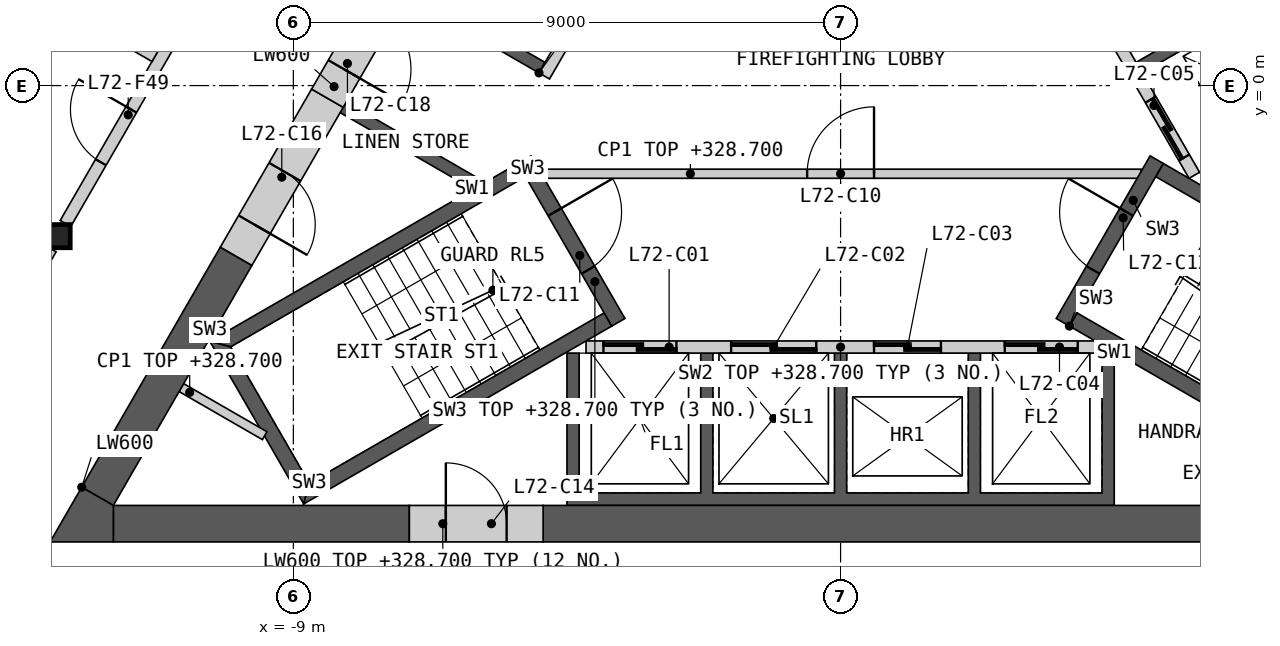
"""IFC4 building model, lengths in metres.
Left out: names, types, materials, properties, quantities, classifications, styles, units other than length and angle.
Written with IfcOpenShell. Run it as: python <this file> out.ifc"""

import sys

from ifc_helpers import new_model, si_unit, direction, frame, frame_2d, origin, origin_2d, place, context, subcontext, project, spatial, polyline, rectangle, i_section, outline, extrude, element, fill, save


model = new_model("IFC4")
c1 = context("Model", 3, precision=1e-05, world=origin(), true_north=direction((0.0, 1.0)))
c2 = subcontext(c1, "Body", "Model", "MODEL_VIEW")
j1 = project(units=[si_unit("LENGTHUNIT", "METRE"), si_unit("PLANEANGLEUNIT", "RADIAN")], contexts=[c1])
p1 = place(None, origin())
s1 = spatial("IfcSite", under=j1, at=p1, CompositionType="ELEMENT")
p2 = place(p1, origin())
s2 = spatial("IfcBuilding", under=s1, at=p2, CompositionType="ELEMENT")
p3 = place(p2, frame((0.0, 0.0, 325.6)))
s3 = spatial("IfcBuildingStorey", under=s2, at=p3, CompositionType="ELEMENT", Elevation=325.6)
p4 = place(p3, frame((-12.868, -2.476, 0.0), z_axis=(0.0, 0.0, 1.0), x_axis=(1.0, 0.0, 0.0)))
e1 = element("IfcColumn", 1, at=p4, inside=s3, PredefinedType="COLUMN", context=c2, shape_type="SweptSolid", body=[
    extrude(i_section(OverallWidth=0.396, OverallDepth=0.381, WebThickness=0.019, FlangeThickness=0.03, at=origin_2d()), origin(), (0.0, 0.0, 1.0), 3.4),
])
p5 = place(p3, origin())
e2 = element("IfcWall", 2, at=p5, inside=s3, PredefinedType="SHEAR", context=c2, shape_type="SweptSolid", body=[
    extrude(outline(polyline([(4.5, -4.4), (4.5, -6.906), (-4.5, -6.906), (-4.5, -4.4), (-4.3, -4.4), (-4.3, -6.7), (-2.3, -6.7), (-2.3, -4.4), (-2.1, -4.4), (-2.1, -6.7), (-0.1, -6.7), (-0.1, -4.4), (0.1, -4.4), (0.1, -6.7), (2.1, -6.7), (2.1, -4.4), (2.3, -4.4), (2.3, -6.7), (4.3, -6.7), (4.3, -4.4), (4.5, -4.4)])), origin(), (0.0, 0.0, 1.0), 3.1),
])
p6 = place(p3, frame((-4.187, -4.3, 0.0), z_axis=(0.0, 0.0, 1.0), x_axis=(1.0, 0.0, 0.0)))
e3 = element("IfcWall", 3, at=p6, inside=s3, PredefinedType="SOLIDWALL", context=c2, shape_type="SweptSolid", body=[
    extrude(rectangle(XDim=8.373, YDim=0.2, at=frame_2d((4.187, 0.0))), origin(), (0.0, 0.0, 1.0), 3.1),
])
p7 = place(p6, frame((0.287, 0.0, 0.0)))
e4 = element("IfcOpeningElement", 4, at=p7, cuts=e3, PredefinedType="OPENING", context=c2, shape_type="SweptSolid", body=[
    extrude(rectangle(XDim=1.2, YDim=2.1, at=frame_2d((0.6, 1.05))), frame((0.0, 0.11, 0.0), z_axis=(0.0, -1.0, 0.0), x_axis=(1.0, 0.0, 0.0)), (0.0, 0.0, 1.0), 0.22),
])
p8 = place(p6, frame((2.387, 0.0, 0.0)))
e5 = element("IfcOpeningElement", 5, at=p8, cuts=e3, PredefinedType="OPENING", context=c2, shape_type="SweptSolid", body=[
    extrude(rectangle(XDim=1.4, YDim=2.1, at=frame_2d((0.7, 1.05))), frame((0.0, 0.11, 0.0), z_axis=(0.0, -1.0, 0.0), x_axis=(1.0, 0.0, 0.0)), (0.0, 0.0, 1.0), 0.22),
])
p9 = place(p6, frame((4.737, 0.0, 0.0)))
e6 = element("IfcOpeningElement", 6, at=p9, cuts=e3, PredefinedType="OPENING", context=c2, shape_type="SweptSolid", body=[
    extrude(rectangle(XDim=1.1, YDim=2.1, at=frame_2d((0.55, 1.05))), frame((0.0, 0.11, 0.0), z_axis=(0.0, -1.0, 0.0), x_axis=(1.0, 0.0, 0.0)), (0.0, 0.0, 1.0), 0.22),
])
p10 = place(p6, frame((6.887, 0.0, 0.0)))
e7 = element("IfcOpeningElement", 7, at=p10, cuts=e3, PredefinedType="OPENING", context=c2, shape_type="SweptSolid", body=[
    extrude(rectangle(XDim=1.2, YDim=2.1, at=frame_2d((0.6, 1.05))), frame((0.0, 0.11, 0.0), z_axis=(0.0, -1.0, 0.0), x_axis=(1.0, 0.0, 0.0)), (0.0, 0.0, 1.0), 0.22),
])
p11 = place(p3, origin())
e8 = element("IfcWall", 8, at=p11, inside=s3, PredefinedType="SHEAR", context=c2, shape_type="SweptSolid", body=[
    extrude(outline(polyline([(1.561, 6.097), (3.731, 7.35), (8.231, -0.444), (6.061, -1.697), (5.96, -1.524), (7.952, -0.374), (6.952, 1.358), (4.96, 0.208), (4.861, 0.381), (6.852, 1.531), (5.852, 3.263), (3.861, 2.113), (3.76, 2.287), (5.752, 3.437), (4.752, 5.169), (2.76, 4.019), (2.66, 4.192), (4.652, 5.342), (3.652, 7.074), (1.66, 5.924), (1.561, 6.097)])), origin(), (0.0, 0.0, 1.0), 3.1),
])
p12 = place(p3, frame((5.817, -1.476, 0.0), z_axis=(0.0, 0.0, 1.0), x_axis=(-0.500002616675, 0.866023893041, 0.0)))
e9 = element("IfcWall", 9, at=p12, inside=s3, PredefinedType="SOLIDWALL", context=c2, shape_type="SweptSolid", body=[
    extrude(rectangle(XDim=8.373, YDim=0.2, at=frame_2d((4.187, 0.0))), origin(), (0.0, 0.0, 1.0), 3.1),
])
p13 = place(p12, frame((0.337, 0.0, 0.0)))
e10 = element("IfcOpeningElement", 10, at=p13, cuts=e9, PredefinedType="OPENING", context=c2, shape_type="SweptSolid", body=[
    extrude(rectangle(XDim=1.1, YDim=2.1, at=frame_2d((0.55, 1.05))), frame((0.0, 0.11, 0.0), z_axis=(0.0, -1.0, 0.0), x_axis=(1.0, 0.0, 0.0)), (0.0, 0.0, 1.0), 0.22),
])
p14 = place(p12, frame((2.537, 0.0, 0.0)))
e11 = element("IfcOpeningElement", 11, at=p14, cuts=e9, PredefinedType="OPENING", context=c2, shape_type="SweptSolid", body=[
    extrude(rectangle(XDim=1.1, YDim=2.1, at=frame_2d((0.55, 1.05))), frame((0.0, 0.11, 0.0), z_axis=(0.0, -1.0, 0.0), x_axis=(1.0, 0.0, 0.0)), (0.0, 0.0, 1.0), 0.22),
])
p15 = place(p12, frame((4.737, 0.0, 0.0)))
e12 = element("IfcOpeningElement", 12, at=p15, cuts=e9, PredefinedType="OPENING", context=c2, shape_type="SweptSolid", body=[
    extrude(rectangle(XDim=1.1, YDim=2.1, at=frame_2d((0.55, 1.05))), frame((0.0, 0.11, 0.0), z_axis=(0.0, -1.0, 0.0), x_axis=(1.0, 0.0, 0.0)), (0.0, 0.0, 1.0), 0.22),
])
p16 = place(p12, frame((7.037, 0.0, 0.0)))
e13 = element("IfcOpeningElement", 13, at=p16, cuts=e9, PredefinedType="OPENING", context=c2, shape_type="SweptSolid", body=[
    extrude(rectangle(XDim=0.9, YDim=2.1, at=frame_2d((0.45, 1.05))), frame((0.0, 0.11, 0.0), z_axis=(0.0, -1.0, 0.0), x_axis=(1.0, 0.0, 0.0)), (0.0, 0.0, 1.0), 0.22),
])
p17 = place(p3, origin())
e14 = element("IfcWall", 14, at=p17, inside=s3, PredefinedType="SHEAR", context=c2, shape_type="SweptSolid", body=[
    extrude(outline(polyline([(-6.061, -1.697), (-8.231, -0.444), (-8.131, -0.271), (-5.96, -1.524), (-6.061, -1.697)])), origin(), (0.0, 0.0, 1.0), 3.1),
])
p18 = place(p3, origin())
e15 = element("IfcWall", 15, at=p18, inside=s3, PredefinedType="SHEAR", context=c2, shape_type="SweptSolid", body=[
    extrude(outline(polyline([(-4.96, 0.208), (-7.131, 1.461), (-3.731, 7.35), (-1.561, 6.097), (-1.66, 5.924), (-3.652, 7.074), (-6.852, 1.531), (-4.861, 0.381), (-4.96, 0.208)])), origin(), (0.0, 0.0, 1.0), 3.1),
])
p19 = place(p3, frame((-1.631, 5.776, 0.0), z_axis=(0.0, 0.0, 1.0), x_axis=(-0.499992876559, -0.866029516466, 0.0)))
e16 = element("IfcWall", 16, at=p19, inside=s3, PredefinedType="SOLIDWALL", context=c2, shape_type="SweptSolid", body=[
    extrude(rectangle(XDim=6.486, YDim=0.2, at=frame_2d((3.243, 0.0))), origin(), (0.0, 0.0, 1.0), 3.1),
])
p20 = place(p19, frame((2.637, 0.0, 0.0)))
e17 = element("IfcOpeningElement", 17, at=p20, cuts=e16, PredefinedType="OPENING", context=c2, shape_type="SweptSolid", body=[
    extrude(rectangle(XDim=0.9, YDim=2.1, at=frame_2d((0.45, 1.05))), frame((0.0, 0.11, 0.0), z_axis=(0.0, -1.0, 0.0), x_axis=(1.0, 0.0, 0.0)), (0.0, 0.0, 1.0), 0.22),
])
p21 = place(p3, frame((-4.941, -1.45, 0.0), z_axis=(0.0, 0.0, 1.0), x_axis=(1.0, 0.0, 0.0)))
e18 = element("IfcWall", 18, at=p21, inside=s3, PredefinedType="PARTITIONING", context=c2, shape_type="SweptSolid", body=[
    extrude(rectangle(XDim=9.882, YDim=0.15, at=frame_2d((4.941, 0.0))), origin(), (0.0, 0.0, 1.0), 3.1),
])
p22 = place(p21, frame((4.391, 0.0, 0.0)))
e19 = element("IfcOpeningElement", 19, at=p22, cuts=e18, PredefinedType="OPENING", context=c2, shape_type="SweptSolid", body=[
    extrude(rectangle(XDim=1.1, YDim=2.1, at=frame_2d((0.55, 1.05))), frame((0.0, 0.085, 0.0), z_axis=(0.0, -1.0, 0.0), x_axis=(1.0, 0.0, 0.0)), (0.0, 0.0, 1.0), 0.17),
])
p23 = place(p3, origin())
e20 = element("IfcWall", 20, at=p23, inside=s3, PredefinedType="SHEAR", context=c2, shape_type="SweptSolid", body=[
    extrude(outline(polyline([(-5.307, -1.281), (-10.374, -4.206), (-10.032, -4.298), (-5.182, -1.498), (-5.307, -1.281)])), origin(), (0.0, 0.0, 1.0), 3.1),
])
p24 = place(p3, origin())
e21 = element("IfcWall", 21, at=p24, inside=s3, PredefinedType="SHEAR", context=c2, shape_type="SweptSolid", body=[
    extrude(outline(polyline([(-10.374, -4.206), (-8.83, -6.881), (-8.738, -6.539), (-10.032, -4.298), (-10.374, -4.206)])), origin(), (0.0, 0.0, 1.0), 3.1),
])
p25 = place(p3, origin())
e22 = element("IfcWall", 22, at=p25, inside=s3, PredefinedType="SHEAR", context=c2, shape_type="SweptSolid", body=[
    extrude(outline(polyline([(-8.738, -6.539), (-8.83, -6.881), (-3.763, -3.956), (-3.888, -3.739), (-8.738, -6.539)])), origin(), (0.0, 0.0, 1.0), 3.1),
])
p26 = place(p3, frame((-5.199, -1.219, 0.0), z_axis=(0.0, 0.0, 1.0), x_axis=(0.499982516597, -0.866035497597, 0.0)))
e23 = element("IfcWall", 23, at=p26, inside=s3, PredefinedType="SHEAR", context=c2, shape_type="SweptSolid", body=[
    extrude(rectangle(XDim=3.088, YDim=0.25, at=frame_2d((1.544, 0.0))), origin(), (0.0, 0.0, 1.0), 3.1),
])
p27 = place(p26, frame((0.994, 0.0, 0.0)))
e24 = element("IfcOpeningElement", 24, at=p27, cuts=e23, PredefinedType="OPENING", context=c2, shape_type="SweptSolid", body=[
    extrude(rectangle(XDim=1.1, YDim=2.1, at=frame_2d((0.55, 1.05))), frame((0.0, 0.135, 0.0), z_axis=(0.0, -1.0, 0.0), x_axis=(1.0, 0.0, 0.0)), (0.0, 0.0, 1.0), 0.27),
])
p28 = place(p3, origin())
e25 = element("IfcWall", 25, at=p28, inside=s3, PredefinedType="SHEAR", context=c2, shape_type="SweptSolid", body=[
    extrude(outline(polyline([(3.763, -3.956), (8.83, -6.881), (8.738, -6.539), (3.888, -3.739), (3.763, -3.956)])), origin(), (0.0, 0.0, 1.0), 3.1),
])
p29 = place(p3, origin())
e26 = element("IfcWall", 26, at=p29, inside=s3, PredefinedType="SHEAR", context=c2, shape_type="SweptSolid", body=[
    extrude(outline(polyline([(10.032, -4.298), (10.374, -4.206), (5.307, -1.281), (5.182, -1.498), (10.032, -4.298)])), origin(), (0.0, 0.0, 1.0), 3.1),
])
p30 = place(p3, frame((3.655, -3.893, 0.0), z_axis=(0.0, 0.0, 1.0), x_axis=(0.499982516597, 0.866035497597, 0.0)))
e27 = element("IfcWall", 27, at=p30, inside=s3, PredefinedType="SHEAR", context=c2, shape_type="SweptSolid", body=[
    extrude(rectangle(XDim=3.088, YDim=0.25, at=frame_2d((1.544, 0.0))), origin(), (0.0, 0.0, 1.0), 3.1),
])
p31 = place(p30, frame((0.994, 0.0, 0.0)))
e28 = element("IfcOpeningElement", 28, at=p31, cuts=e27, PredefinedType="OPENING", context=c2, shape_type="SweptSolid", body=[
    extrude(rectangle(XDim=1.1, YDim=2.1, at=frame_2d((0.55, 1.05))), frame((0.0, 0.135, 0.0), z_axis=(0.0, -1.0, 0.0), x_axis=(1.0, 0.0, 0.0)), (0.0, 0.0, 1.0), 0.27),
])
p32 = place(p3, frame((-10.842, -4.967, 0.0), z_axis=(0.0, 0.0, 1.0), x_axis=(0.866098216386, -0.499873863663, 0.0)))
e29 = element("IfcWall", 29, at=p32, inside=s3, PredefinedType="PARTITIONING", context=c2, shape_type="SweptSolid", body=[
    extrude(rectangle(XDim=1.582, YDim=0.15, at=frame_2d((0.791, 0.0))), origin(), (0.0, 0.0, 1.0), 3.1),
])
p33 = place(p3, frame((-4.892, -7.206, 0.0), z_axis=(0.0, 0.0, 1.0), x_axis=(1.0, 0.0, 0.0)))
e30 = element("IfcWall", 30, at=p33, inside=s3, PredefinedType="SHEAR", context=c2, shape_type="SweptSolid", body=[
    extrude(rectangle(XDim=16.853, YDim=0.6, at=frame_2d((8.426, 0.0))), origin(), (0.0, 0.0, 1.0), 3.1),
])
p34 = place(p3, frame((-11.961, -7.206, 0.0), z_axis=(0.0, 0.0, 1.0), x_axis=(1.0, 0.0, 0.0)))
e31 = element("IfcWall", 31, at=p34, inside=s3, PredefinedType="SHEAR", context=c2, shape_type="SweptSolid", body=[
    extrude(rectangle(XDim=4.868, YDim=0.6, at=frame_2d((2.434, 0.0))), origin(), (0.0, 0.0, 1.0), 3.1),
])
p35 = place(p3, frame((8.686, -0.634, 0.0), z_axis=(0.0, 0.0, 1.0), x_axis=(-0.500004601921, 0.866022746848, 0.0)))
e32 = element("IfcWall", 32, at=p35, inside=s3, PredefinedType="SHEAR", context=c2, shape_type="SweptSolid", body=[
    extrude(rectangle(XDim=16.853, YDim=0.6, at=frame_2d((8.426, 0.0))), origin(), (0.0, 0.0, 1.0), 3.1),
])
p36 = place(p3, frame((-9.941, -2.807, 0.0), z_axis=(0.0, 0.0, 1.0), x_axis=(-0.500020646047, -0.866013483456, 0.0)))
e33 = element("IfcWall", 33, at=p36, inside=s3, PredefinedType="SHEAR", context=c2, shape_type="SweptSolid", body=[
    extrude(rectangle(XDim=4.559, YDim=0.6, at=frame_2d((2.28, 0.0))), origin(), (0.0, 0.0, 1.0), 3.1),
])
p37 = place(p3, origin())
e34 = element("IfcWall", 34, at=p37, inside=s3, PredefinedType="SHEAR", context=c2, shape_type="SweptSolid", body=[
    extrude(outline(polyline([(-12.48, -6.606), (-11.961, -6.906), (-11.961, -7.506), (-13.0, -7.506), (-12.48, -6.606)])), origin(), (0.0, 0.0, 1.0), 3.1),
])
p38 = place(p3, frame((-7.092, -7.206, 0.0), z_axis=(0.0, 0.0, 1.0), x_axis=(1.0, 0.0, 0.0)))
e35 = element("IfcWall", 35, at=p38, inside=s3, PredefinedType="SHEAR", context=c2, shape_type="SweptSolid", body=[
    extrude(rectangle(XDim=2.2, YDim=0.6, at=frame_2d((1.1, 0.0))), origin(), (0.0, 0.0, 1.0), 3.1),
])
p39 = place(p38, frame((0.6, 0.0, 0.0)))
e36 = element("IfcOpeningElement", 36, at=p39, cuts=e35, PredefinedType="OPENING", context=c2, shape_type="SweptSolid", body=[
    extrude(rectangle(XDim=1.0, YDim=2.1, at=frame_2d((0.5, 1.05))), frame((0.0, 0.31, 0.0), z_axis=(0.0, -1.0, 0.0), x_axis=(1.0, 0.0, 0.0)), (0.0, 0.0, 1.0), 0.62),
])
p40 = place(p3, frame((-8.44, -0.208, 0.0), z_axis=(0.0, 0.0, 1.0), x_axis=(-0.499997052475, -0.866027105532, 0.0)))
e37 = element("IfcWall", 37, at=p40, inside=s3, PredefinedType="SHEAR", context=c2, shape_type="SweptSolid", body=[
    extrude(rectangle(XDim=3.001, YDim=0.6, at=frame_2d((1.501, 0.0))), origin(), (0.0, 0.0, 1.0), 3.1),
])
p41 = place(p40, frame((1.4, 0.0, 0.0)))
e38 = element("IfcOpeningElement", 38, at=p41, cuts=e37, PredefinedType="OPENING", context=c2, shape_type="SweptSolid", body=[
    extrude(rectangle(XDim=1.0, YDim=2.1, at=frame_2d((0.5, 1.05))), frame((0.0, 0.31, 0.0), z_axis=(0.0, -1.0, 0.0), x_axis=(1.0, 0.0, 0.0)), (0.0, 0.0, 1.0), 0.62),
])
p42 = place(p3, frame((-7.34, 1.698, 0.0), z_axis=(0.0, 0.0, 1.0), x_axis=(-0.50002983664, -0.866008176907, 0.0)))
e39 = element("IfcWall", 39, at=p42, inside=s3, PredefinedType="SHEAR", context=c2, shape_type="SweptSolid", body=[
    extrude(rectangle(XDim=2.2, YDim=0.6, at=frame_2d((1.1, 0.0))), origin(), (0.0, 0.0, 1.0), 3.1),
])
p43 = place(p42, frame((0.55, 0.0, 0.0)))
e40 = element("IfcOpeningElement", 40, at=p43, cuts=e39, PredefinedType="OPENING", context=c2, shape_type="SweptSolid", body=[
    extrude(rectangle(XDim=1.1, YDim=2.1, at=frame_2d((0.55, 1.05))), frame((0.0, 0.31, 0.0), z_axis=(0.0, -1.0, 0.0), x_axis=(1.0, 0.0, 0.0)), (0.0, 0.0, 1.0), 0.62),
])
p44 = place(p3, frame((-12.748, -2.269, 0.0), z_axis=(0.0, 0.0, 1.0), x_axis=(0.499984266882, 0.866034487114, 0.0)))
e41 = element("IfcWall", 41, at=p44, inside=s3, PredefinedType="PARTITIONING", context=c2, shape_type="SweptSolid", body=[
    extrude(rectangle(XDim=8.099, YDim=0.2, at=frame_2d((4.049, 0.0))), origin(), (0.0, 0.0, 1.0), 3.1),
])
p45 = place(p44, frame((1.164, 0.0, 0.0)))
e42 = element("IfcOpeningElement", 42, at=p45, cuts=e41, PredefinedType="OPENING", context=c2, shape_type="SweptSolid", body=[
    extrude(rectangle(XDim=1.0, YDim=2.1, at=frame_2d((0.5, 1.05))), frame((0.0, 0.11, 0.0), z_axis=(0.0, -1.0, 0.0), x_axis=(1.0, 0.0, 0.0)), (0.0, 0.0, 1.0), 0.22),
])
p46 = place(p3, frame((-15.244, -6.592, 0.0), z_axis=(0.0, 0.0, 1.0), x_axis=(0.49999094734, 0.866030630277, 0.0)))
e43 = element("IfcWall", 43, at=p46, inside=s3, PredefinedType="PARTITIONING", context=c2, shape_type="SweptSolid", body=[
    extrude(rectangle(XDim=4.513, YDim=0.2, at=frame_2d((2.256, 0.0))), origin(), (0.0, 0.0, 1.0), 3.1),
])
p47 = place(p3, frame((-13.471, 1.779, 0.0), z_axis=(0.0, 0.0, 1.0), x_axis=(0.865989465428, -0.500062241894, 0.0)))
e44 = element("IfcWall", 44, at=p47, inside=s3, PredefinedType="PARTITIONING", context=c2, shape_type="SweptSolid", body=[
    extrude(rectangle(XDim=2.55, YDim=0.25, at=frame_2d((1.275, 0.0))), origin(), (0.0, 0.0, 1.0), 2.33),
])
p48 = place(p3, frame((-14.889, -0.577, 0.0), z_axis=(0.0, 0.0, 1.0), x_axis=(0.500015767406, 0.866016300277, 0.0)))
e45 = element("IfcWall", 45, at=p48, inside=s3, PredefinedType="PARTITIONING", context=c2, shape_type="SweptSolid", body=[
    extrude(rectangle(XDim=5.5, YDim=0.1, at=frame_2d((2.75, 0.0))), origin(), (0.0, 0.0, 1.0), 2.33),
])
p49 = place(p7, origin())
e46 = element("IfcDoor", 46, at=p49, inside=s3, OperationType="SLIDING_TO_LEFT", PredefinedType="DOOR", context=c2, shape_type="SweptSolid", body=[
    extrude(rectangle(XDim=1.2, YDim=2.1, at=frame_2d((0.6, 1.05))), frame((0.0, 0.025, 0.0), z_axis=(0.0, -1.0, 0.0), x_axis=(1.0, 0.0, 0.0)), (0.0, 0.0, 1.0), 0.05),
])
fill(e4, e46)
p50 = place(p8, origin())
e47 = element("IfcDoor", 47, at=p50, inside=s3, OperationType="SLIDING_TO_LEFT", PredefinedType="DOOR", context=c2, shape_type="SweptSolid", body=[
    extrude(rectangle(XDim=1.4, YDim=2.1, at=frame_2d((0.7, 1.05))), frame((0.0, 0.025, 0.0), z_axis=(0.0, -1.0, 0.0), x_axis=(1.0, 0.0, 0.0)), (0.0, 0.0, 1.0), 0.05),
])
fill(e5, e47)
p51 = place(p9, origin())
e48 = element("IfcDoor", 48, at=p51, inside=s3, OperationType="SLIDING_TO_LEFT", PredefinedType="DOOR", context=c2, shape_type="SweptSolid", body=[
    extrude(rectangle(XDim=1.1, YDim=2.1, at=frame_2d((0.55, 1.05))), frame((0.0, 0.025, 0.0), z_axis=(0.0, -1.0, 0.0), x_axis=(1.0, 0.0, 0.0)), (0.0, 0.0, 1.0), 0.05),
])
fill(e6, e48)
p52 = place(p10, origin())
e49 = element("IfcDoor", 49, at=p52, inside=s3, OperationType="SLIDING_TO_LEFT", PredefinedType="DOOR", context=c2, shape_type="SweptSolid", body=[
    extrude(rectangle(XDim=1.2, YDim=2.1, at=frame_2d((0.6, 1.05))), frame((0.0, 0.025, 0.0), z_axis=(0.0, -1.0, 0.0), x_axis=(1.0, 0.0, 0.0)), (0.0, 0.0, 1.0), 0.05),
])
fill(e7, e49)
p53 = place(p13, origin())
e50 = element("IfcDoor", 50, at=p53, inside=s3, OperationType="SLIDING_TO_LEFT", PredefinedType="DOOR", context=c2, shape_type="SweptSolid", body=[
    extrude(rectangle(XDim=1.1, YDim=2.1, at=frame_2d((0.55, 1.05))), frame((0.0, 0.025, 0.0), z_axis=(0.0, -1.0, 0.0), x_axis=(1.0, 0.0, 0.0)), (0.0, 0.0, 1.0), 0.05),
])
fill(e10, e50)
p54 = place(p22, origin())
e51 = element("IfcDoor", 51, at=p54, inside=s3, OperationType="SINGLE_SWING_RIGHT", PredefinedType="DOOR", context=c2, shape_type="SweptSolid", body=[
    extrude(rectangle(XDim=1.1, YDim=2.1, at=frame_2d((0.55, 1.05))), frame((0.0, 0.025, 0.0), z_axis=(0.0, -1.0, 0.0), x_axis=(1.0, 0.0, 0.0)), (0.0, 0.0, 1.0), 0.05),
])
fill(e19, e51)
p55 = place(p27, origin())
e52 = element("IfcDoor", 52, at=p55, inside=s3, OperationType="SINGLE_SWING_LEFT", PredefinedType="DOOR", context=c2, shape_type="SweptSolid", body=[
    extrude(rectangle(XDim=1.1, YDim=2.1, at=frame_2d((0.55, 1.05))), frame((0.0, 0.025, 0.0), z_axis=(0.0, -1.0, 0.0), x_axis=(1.0, 0.0, 0.0)), (0.0, 0.0, 1.0), 0.05),
])
fill(e24, e52)
p56 = place(p31, origin())
e53 = element("IfcDoor", 53, at=p56, inside=s3, OperationType="SINGLE_SWING_RIGHT", PredefinedType="DOOR", context=c2, shape_type="SweptSolid", body=[
    extrude(rectangle(XDim=1.1, YDim=2.1, at=frame_2d((0.55, 1.05))), frame((0.0, 0.025, 0.0), z_axis=(0.0, -1.0, 0.0), x_axis=(1.0, 0.0, 0.0)), (0.0, 0.0, 1.0), 0.05),
])
fill(e28, e53)
p57 = place(p39, origin())
e54 = element("IfcDoor", 54, at=p57, inside=s3, OperationType="SINGLE_SWING_LEFT", PredefinedType="DOOR", context=c2, shape_type="SweptSolid", body=[
    extrude(rectangle(XDim=1.0, YDim=2.1, at=frame_2d((0.5, 1.05))), frame((0.0, 0.055, 0.0), z_axis=(0.0, -1.0, 0.0), x_axis=(1.0, 0.0, 0.0)), (0.0, 0.0, 1.0), 0.05),
])
fill(e36, e54)
p58 = place(p41, origin())
e55 = element("IfcDoor", 55, at=p58, inside=s3, OperationType="SINGLE_SWING_RIGHT", PredefinedType="DOOR", context=c2, shape_type="SweptSolid", body=[
    extrude(rectangle(XDim=1.0, YDim=2.1, at=frame_2d((0.5, 1.05))), frame((0.0, 0.055, 0.0), z_axis=(0.0, -1.0, 0.0), x_axis=(1.0, 0.0, 0.0)), (0.0, 0.0, 1.0), 0.05),
])
fill(e38, e55)
p59 = place(p43, origin())
e56 = element("IfcDoor", 56, at=p59, inside=s3, OperationType="SINGLE_SWING_RIGHT", PredefinedType="DOOR", context=c2, shape_type="SweptSolid", body=[
    extrude(rectangle(XDim=1.1, YDim=2.1, at=frame_2d((0.55, 1.05))), frame((0.0, 0.055, 0.0), z_axis=(0.0, -1.0, 0.0), x_axis=(1.0, 0.0, 0.0)), (0.0, 0.0, 1.0), 0.05),
])
fill(e40, e56)
p60 = place(p45, origin())
e57 = element("IfcDoor", 57, at=p60, inside=s3, OperationType="SINGLE_SWING_RIGHT", PredefinedType="DOOR", context=c2, shape_type="SweptSolid", body=[
    extrude(rectangle(XDim=1.0, YDim=2.1, at=frame_2d((0.5, 1.05))), frame((0.0, 0.025, 0.0), z_axis=(0.0, -1.0, 0.0), x_axis=(1.0, 0.0, 0.0)), (0.0, 0.0, 1.0), 0.05),
])
fill(e42, e57)
save(model, sys.argv[1])
